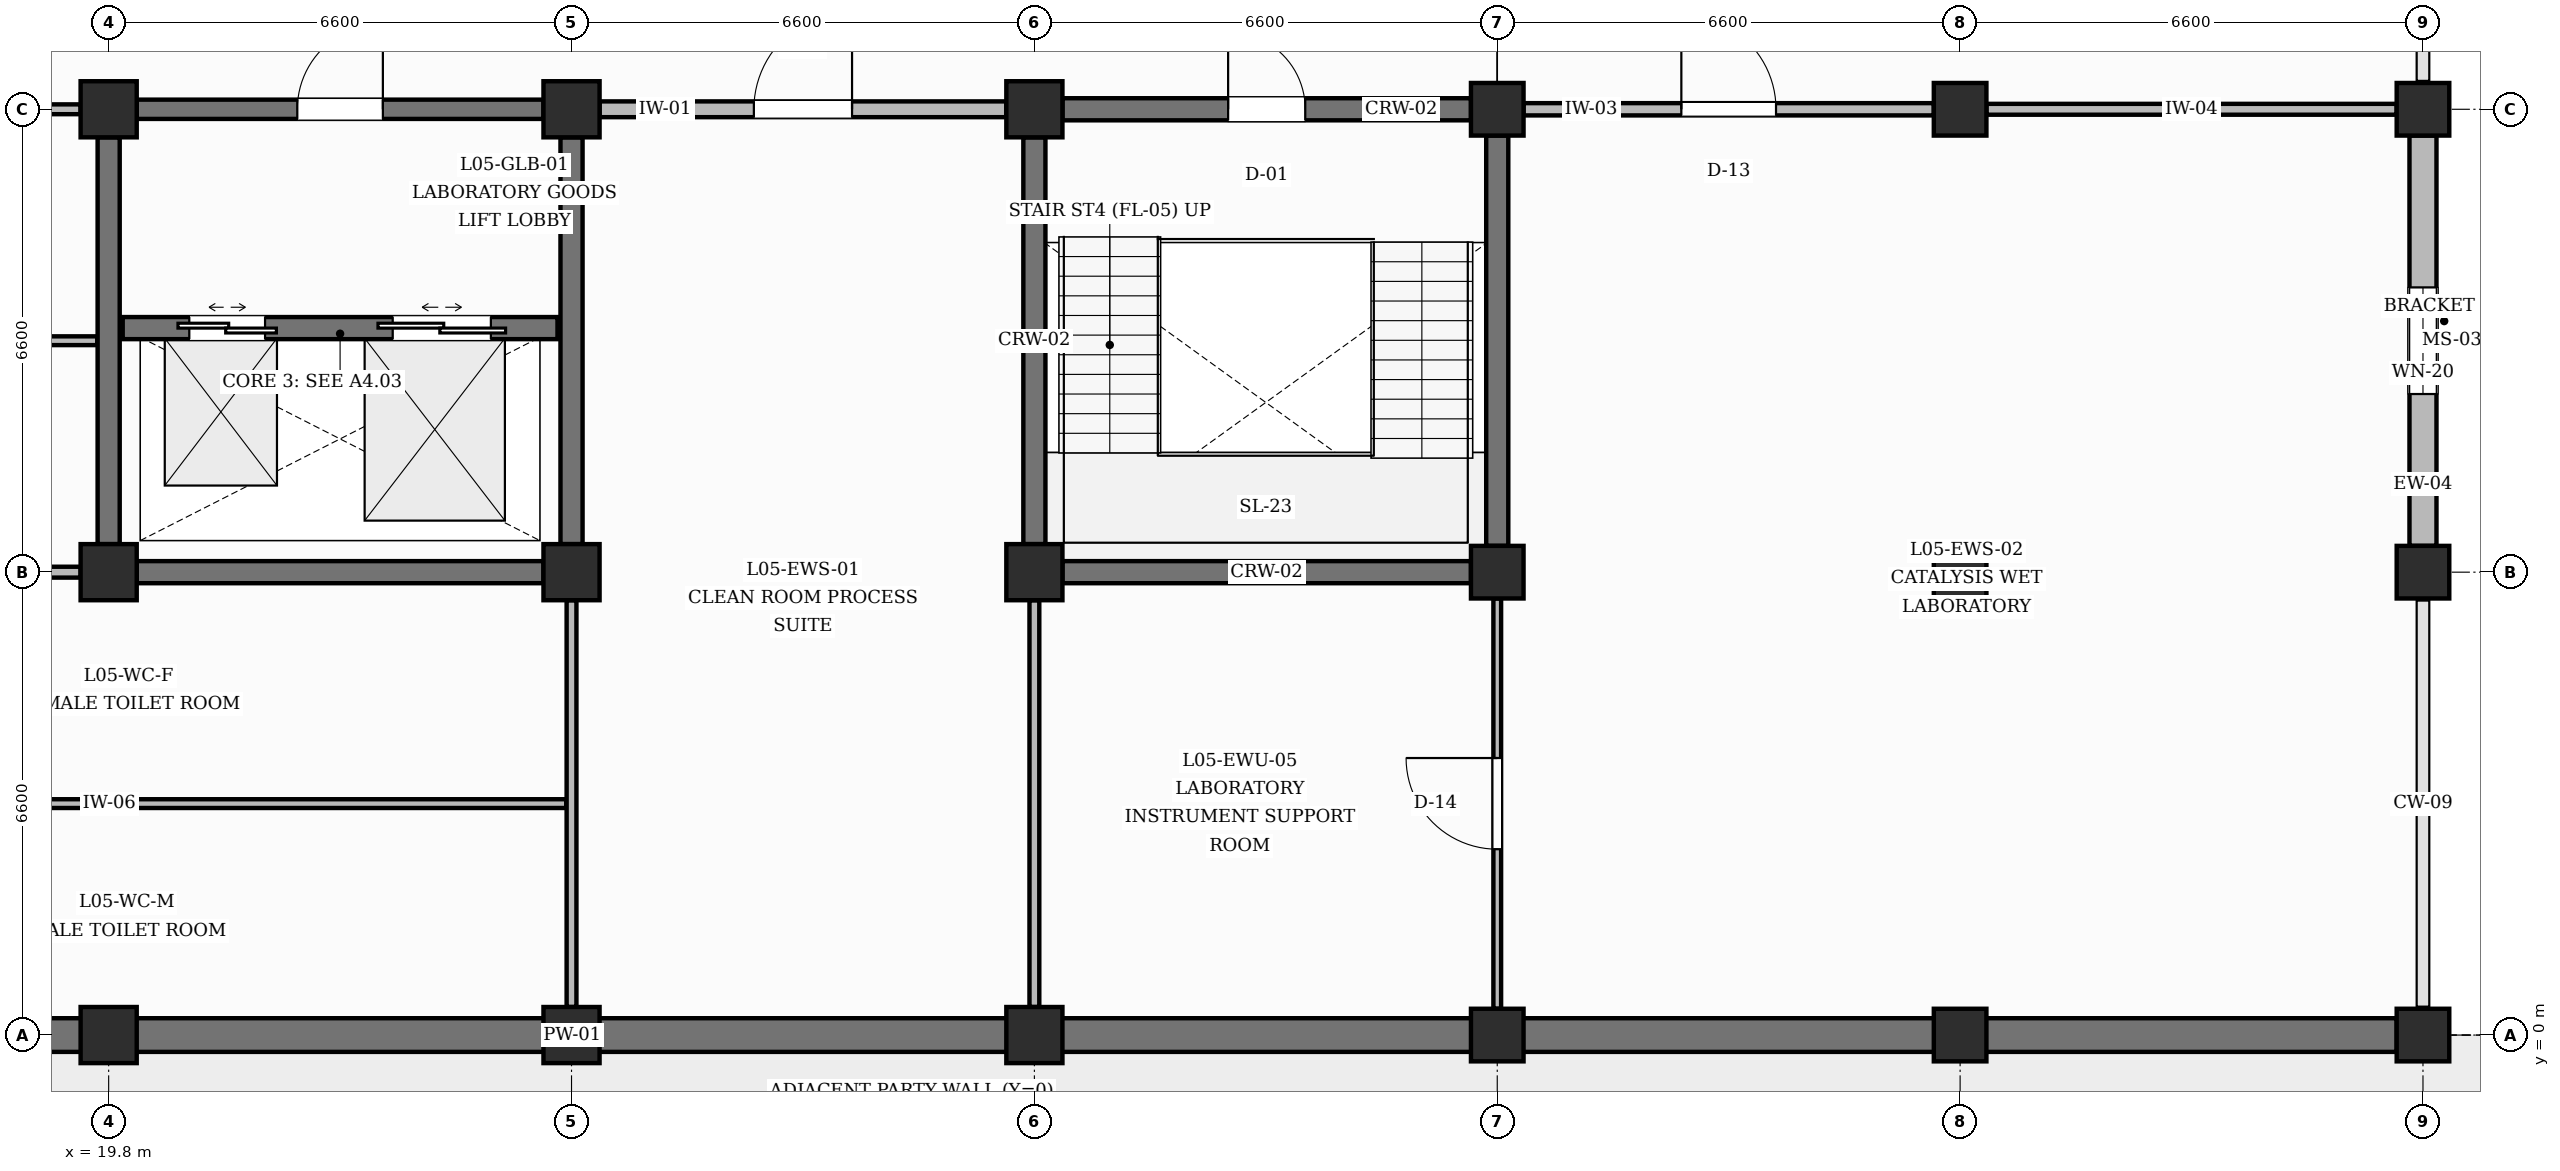
"""IFC4 building model, lengths in metres.
Left out: names, types, materials, properties, quantities, classifications, styles, units other than length and angle.
Written with IfcOpenShell. Run it as: python <this file> out.ifc"""

import sys

from ifc_helpers import new_model, si_unit, direction, frame, frame_2d, origin, origin_2d, place, context, subcontext, project, spatial, rectangle, extrude, element, fill, save


model = new_model("IFC4")
c1 = context("Model", 3, precision=1e-05, world=origin(), true_north=direction((0.0, 1.0)))
c2 = subcontext(c1, "Body", "Model", "MODEL_VIEW")
j1 = project(units=[si_unit("LENGTHUNIT", "METRE"), si_unit("PLANEANGLEUNIT", "RADIAN")], contexts=[c1])
p1 = place(None, origin())
s1 = spatial("IfcSite", under=j1, at=p1, CompositionType="ELEMENT")
p2 = place(p1, origin())
s2 = spatial("IfcBuilding", under=s1, at=p2, CompositionType="ELEMENT")
p3 = place(p2, frame((0.0, 0.0, 22.8)))
s3 = spatial("IfcBuildingStorey", under=s2, at=p3, CompositionType="ELEMENT", Elevation=22.8)
for number, where, z_axis, x_axis in (
    (1, (19.8, 0.0, 0.0), (0.0, 0.0, 1.0), (1.0, 0.0, 0.0)),
    (2, (19.8, 6.6, 0.0), (0.0, 0.0, 1.0), (1.0, 0.0, 0.0)),
    (3, (19.8, 13.2, 0.0), (0.0, 0.0, 1.0), (1.0, 0.0, 0.0)),
    (4, (26.4, 0.0, 0.0), (0.0, 0.0, 1.0), (1.0, 0.0, 0.0)),
    (5, (26.4, 6.6, 0.0), (0.0, 0.0, 1.0), (1.0, 0.0, 0.0)),
    (6, (26.4, 13.2, 0.0), (0.0, 0.0, 1.0), (1.0, 0.0, 0.0)),
    (7, (33.0, 0.0, 0.0), (0.0, 0.0, 1.0), (1.0, 0.0, 0.0)),
    (8, (33.0, 6.6, 0.0), (0.0, 0.0, 1.0), (1.0, 0.0, 0.0)),
    (9, (33.0, 13.2, 0.0), (0.0, 0.0, 1.0), (1.0, 0.0, 0.0)),
):
    element("IfcColumn", number, at=place(p3, frame(where, z_axis=z_axis, x_axis=x_axis)), inside=s3, PredefinedType="COLUMN", context=c2, shape_type="SweptSolid", body=[
        extrude(rectangle(XDim=0.8, YDim=0.8, at=origin_2d()), origin(), (0.0, 0.0, 1.0), 4.2),
    ])
for number, where, z_axis, x_axis in (
    (10, (39.6, 0.0, 0.0), (0.0, 0.0, 1.0), (1.0, 0.0, 0.0)),
    (11, (39.6, 6.6, 0.0), (0.0, 0.0, 1.0), (1.0, 0.0, 0.0)),
    (12, (39.6, 13.2, 0.0), (0.0, 0.0, 1.0), (1.0, 0.0, 0.0)),
    (13, (46.2, 0.0, 0.0), (0.0, 0.0, 1.0), (1.0, 0.0, 0.0)),
    (14, (46.2, 6.6, 0.0), (0.0, 0.0, 1.0), (1.0, 0.0, 0.0)),
    (15, (46.2, 13.2, 0.0), (0.0, 0.0, 1.0), (1.0, 0.0, 0.0)),
    (16, (52.8, 0.0, 0.0), (0.0, 0.0, 1.0), (1.0, 0.0, 0.0)),
    (17, (52.8, 6.6, 0.0), (0.0, 0.0, 1.0), (1.0, 0.0, 0.0)),
    (18, (52.8, 13.2, 0.0), (0.0, 0.0, 1.0), (1.0, 0.0, 0.0)),
):
    element("IfcColumn", number, at=place(p3, frame(where, z_axis=z_axis, x_axis=x_axis)), inside=s3, PredefinedType="COLUMN", context=c2, shape_type="SweptSolid", body=[
        extrude(rectangle(XDim=0.75, YDim=0.75, at=origin_2d()), origin(), (0.0, 0.0, 1.0), 4.2),
    ])
p4 = place(p3, frame((13.6, 0.0, 0.0), z_axis=(0.0, 0.0, 1.0), x_axis=(1.0, 0.0, 0.0)))
e19 = element("IfcWall", 19, at=p4, inside=s3, PredefinedType="SOLIDWALL", context=c2, shape_type="SweptSolid", body=[
    extrude(rectangle(XDim=5.8, YDim=0.48, at=frame_2d((2.9, 0.0))), origin(), (0.0, 0.0, 1.0), 3.27),
])
for number, where, z_axis, x_axis in (
    (20, (20.2, 0.0, 0.0), (0.0, 0.0, 1.0), (1.0, 0.0, 0.0)),
    (21, (26.8, 0.0, 0.0), (0.0, 0.0, 1.0), (1.0, 0.0, 0.0)),
):
    element("IfcWall", number, at=place(p3, frame(where, z_axis=z_axis, x_axis=x_axis)), inside=s3, PredefinedType="SOLIDWALL", context=c2, shape_type="SweptSolid", body=[
        extrude(rectangle(XDim=5.8, YDim=0.48, at=frame_2d((2.9, 0.0))), origin(), (0.0, 0.0, 1.0), 3.27),
    ])
p5 = place(p3, frame((33.4, 0.0, 0.0), z_axis=(0.0, 0.0, 1.0), x_axis=(1.0, 0.0, 0.0)))
e22 = element("IfcWall", 22, at=p5, inside=s3, PredefinedType="SOLIDWALL", context=c2, shape_type="SweptSolid", body=[
    extrude(rectangle(XDim=5.825, YDim=0.48, at=frame_2d((2.913, 0.0))), origin(), (0.0, 0.0, 1.0), 3.27),
])
p6 = place(p3, frame((39.975, 0.0, 0.0), z_axis=(0.0, 0.0, 1.0), x_axis=(1.0, 0.0, 0.0)))
e23 = element("IfcWall", 23, at=p6, inside=s3, PredefinedType="SOLIDWALL", context=c2, shape_type="SweptSolid", body=[
    extrude(rectangle(XDim=5.85, YDim=0.48, at=frame_2d((2.925, 0.0))), origin(), (0.0, 0.0, 1.0), 3.27),
])
p7 = place(p3, frame((46.575, 0.0, 0.0), z_axis=(0.0, 0.0, 1.0), x_axis=(1.0, 0.0, 0.0)))
e24 = element("IfcWall", 24, at=p7, inside=s3, PredefinedType="SOLIDWALL", context=c2, shape_type="SweptSolid", body=[
    extrude(rectangle(XDim=5.85, YDim=0.48, at=frame_2d((2.925, 0.0))), origin(), (0.0, 0.0, 1.0), 3.27),
])
p8 = place(p3, frame((52.8, 6.975, 0.0), z_axis=(0.0, 0.0, 1.0), x_axis=(0.0, 1.0, 0.0)))
e25 = element("IfcWall", 25, at=p8, inside=s3, PredefinedType="SOLIDWALL", context=c2, shape_type="SweptSolid", body=[
    extrude(rectangle(XDim=5.85, YDim=0.385, at=frame_2d((2.925, 0.0))), origin(), (0.0, 0.0, 1.0), 3.27),
])
p9 = place(p8, frame((2.165, 0.0, 0.95)))
e26 = element("IfcOpeningElement", 26, at=p9, cuts=e25, PredefinedType="OPENING", context=c2, shape_type="SweptSolid", body=[
    extrude(rectangle(XDim=1.52, YDim=1.96, at=frame_2d((0.76, 0.98))), frame((0.0, 0.202, 0.0), z_axis=(0.0, -1.0, 0.0), x_axis=(1.0, 0.0, 0.0)), (0.0, 0.0, 1.0), 0.405),
])
p10 = place(p3, frame((33.4, 6.6, 0.0), z_axis=(0.0, 0.0, 1.0), x_axis=(1.0, 0.0, 0.0)))
e27 = element("IfcWall", 27, at=p10, inside=s3, PredefinedType="SHEAR", context=c2, shape_type="SweptSolid", body=[
    extrude(rectangle(XDim=5.825, YDim=0.315, at=frame_2d((2.913, 0.0))), origin(), (0.0, 0.0, 1.0), 3.17),
])
p11 = place(p3, frame((33.4, 13.2, 0.0), z_axis=(0.0, 0.0, 1.0), x_axis=(1.0, 0.0, 0.0)))
e28 = element("IfcWall", 28, at=p11, inside=s3, PredefinedType="SHEAR", context=c2, shape_type="SweptSolid", body=[
    extrude(rectangle(XDim=5.825, YDim=0.315, at=frame_2d((2.913, 0.0))), origin(), (0.0, 0.0, 1.0), 3.17),
])
p12 = place(p11, frame((2.363, 0.0, 0.0)))
e29 = element("IfcOpeningElement", 29, at=p12, cuts=e28, PredefinedType="OPENING", context=c2, shape_type="SweptSolid", body=[
    extrude(rectangle(XDim=1.1, YDim=2.15, at=frame_2d((0.55, 1.075))), frame((0.0, 0.167, 0.0), z_axis=(0.0, -1.0, 0.0), x_axis=(1.0, 0.0, 0.0)), (0.0, 0.0, 1.0), 0.335),
])
p13 = place(p3, frame((33.0, 7.0, 0.0), z_axis=(0.0, 0.0, 1.0), x_axis=(0.0, 1.0, 0.0)))
e30 = element("IfcWall", 30, at=p13, inside=s3, PredefinedType="SHEAR", context=c2, shape_type="SweptSolid", body=[
    extrude(rectangle(XDim=5.8, YDim=0.315, at=frame_2d((2.9, 0.0))), origin(), (0.0, 0.0, 1.0), 3.17),
])
p14 = place(p3, frame((39.6, 6.975, 0.0), z_axis=(0.0, 0.0, 1.0), x_axis=(0.0, 1.0, 0.0)))
e31 = element("IfcWall", 31, at=p14, inside=s3, PredefinedType="SHEAR", context=c2, shape_type="SweptSolid", body=[
    extrude(rectangle(XDim=5.85, YDim=0.315, at=frame_2d((2.925, 0.0))), origin(), (0.0, 0.0, 1.0), 3.17),
])
for number, where, z_axis, x_axis in (
    (32, (20.2, 6.6, 0.0), (0.0, 0.0, 1.0), (1.0, 0.0, 0.0)),
    (33, (19.8, 7.0, 0.0), (0.0, 0.0, 1.0), (0.0, 1.0, 0.0)),
    (34, (26.4, 7.0, 0.0), (0.0, 0.0, 1.0), (0.0, 1.0, 0.0)),
):
    element("IfcWall", number, at=place(p3, frame(where, z_axis=z_axis, x_axis=x_axis)), inside=s3, PredefinedType="SHEAR", context=c2, shape_type="SweptSolid", body=[
        extrude(rectangle(XDim=5.8, YDim=0.315, at=frame_2d((2.9, 0.0))), origin(), (0.0, 0.0, 1.0), 3.17),
    ])
p15 = place(p3, frame((20.2, 13.2, 0.0), z_axis=(0.0, 0.0, 1.0), x_axis=(1.0, 0.0, 0.0)))
e35 = element("IfcWall", 35, at=p15, inside=s3, PredefinedType="SHEAR", context=c2, shape_type="SweptSolid", body=[
    extrude(rectangle(XDim=5.8, YDim=0.275, at=frame_2d((2.9, 0.0))), origin(), (0.0, 0.0, 1.0), 3.17),
])
p16 = place(p15, frame((2.29, 0.0, 0.0)))
e36 = element("IfcOpeningElement", 36, at=p16, cuts=e35, PredefinedType="OPENING", context=c2, shape_type="SweptSolid", body=[
    extrude(rectangle(XDim=1.22, YDim=2.15, at=frame_2d((0.61, 1.075))), frame((0.0, 0.147, 0.0), z_axis=(0.0, -1.0, 0.0), x_axis=(1.0, 0.0, 0.0)), (0.0, 0.0, 1.0), 0.295),
])
p17 = place(p3, frame((20.0, 10.08, 0.0), z_axis=(0.0, 0.0, 1.0), x_axis=(1.0, 0.0, 0.0)))
e37 = element("IfcWall", 37, at=p17, inside=s3, PredefinedType="SHEAR", context=c2, shape_type="SweptSolid", body=[
    extrude(rectangle(XDim=6.2, YDim=0.315, at=frame_2d((3.1, 0.0))), origin(), (0.0, 0.0, 1.0), 3.87),
])
p18 = place(p17, frame((0.95, 0.0, 0.0)))
e38 = element("IfcOpeningElement", 38, at=p18, cuts=e37, PredefinedType="OPENING", context=c2, shape_type="SweptSolid", body=[
    extrude(rectangle(XDim=1.08, YDim=2.15, at=frame_2d((0.54, 1.075))), frame((0.0, 0.167, 0.0), z_axis=(0.0, -1.0, 0.0), x_axis=(1.0, 0.0, 0.0)), (0.0, 0.0, 1.0), 0.335),
])
p19 = place(p17, frame((3.85, 0.0, 0.0)))
e39 = element("IfcOpeningElement", 39, at=p19, cuts=e37, PredefinedType="OPENING", context=c2, shape_type="SweptSolid", body=[
    extrude(rectangle(XDim=1.4, YDim=2.35, at=frame_2d((0.7, 1.175))), frame((0.0, 0.167, 0.0), z_axis=(0.0, -1.0, 0.0), x_axis=(1.0, 0.0, 0.0)), (0.0, 0.0, 1.0), 0.335),
])
p20 = place(p3, frame((26.4, 0.4, 0.0), z_axis=(0.0, 0.0, 1.0), x_axis=(0.0, 1.0, 0.0)))
e40 = element("IfcWall", 40, at=p20, inside=s3, PredefinedType="PARTITIONING", context=c2, shape_type="SweptSolid", body=[
    extrude(rectangle(XDim=5.8, YDim=0.14, at=frame_2d((2.9, 0.0))), origin(), (0.0, 0.0, 1.0), 3.17),
])
p21 = place(p3, frame((13.6, 6.6, 0.0), z_axis=(0.0, 0.0, 1.0), x_axis=(1.0, 0.0, 0.0)))
e41 = element("IfcWall", 41, at=p21, inside=s3, PredefinedType="PARTITIONING", context=c2, shape_type="SweptSolid", body=[
    extrude(rectangle(XDim=5.8, YDim=0.155, at=frame_2d((2.9, 0.0))), origin(), (0.0, 0.0, 1.0), 3.17),
])
p22 = place(p3, frame((13.6, 13.2, 0.0), z_axis=(0.0, 0.0, 1.0), x_axis=(1.0, 0.0, 0.0)))
e42 = element("IfcWall", 42, at=p22, inside=s3, PredefinedType="PARTITIONING", context=c2, shape_type="SweptSolid", body=[
    extrude(rectangle(XDim=5.8, YDim=0.14, at=frame_2d((2.9, 0.0))), origin(), (0.0, 0.0, 1.0), 3.17),
])
p23 = place(p3, frame((33.0, 0.4, 0.0), z_axis=(0.0, 0.0, 1.0), x_axis=(0.0, 1.0, 0.0)))
e43 = element("IfcWall", 43, at=p23, inside=s3, PredefinedType="PARTITIONING", context=c2, shape_type="SweptSolid", body=[
    extrude(rectangle(XDim=5.8, YDim=0.14, at=frame_2d((2.9, 0.0))), origin(), (0.0, 0.0, 1.0), 3.17),
])
p24 = place(p3, frame((26.8, 13.2, 0.0), z_axis=(0.0, 0.0, 1.0), x_axis=(1.0, 0.0, 0.0)))
e44 = element("IfcWall", 44, at=p24, inside=s3, PredefinedType="PARTITIONING", context=c2, shape_type="SweptSolid", body=[
    extrude(rectangle(XDim=5.8, YDim=0.225, at=frame_2d((2.9, 0.0))), origin(), (0.0, 0.0, 1.0), 3.17),
])
p25 = place(p24, frame((2.2, 0.0, 0.0)))
e45 = element("IfcOpeningElement", 45, at=p25, cuts=e44, PredefinedType="OPENING", context=c2, shape_type="SweptSolid", body=[
    extrude(rectangle(XDim=1.4, YDim=2.25, at=frame_2d((0.7, 1.125))), frame((0.0, 0.123, 0.0), z_axis=(0.0, -1.0, 0.0), x_axis=(1.0, 0.0, 0.0)), (0.0, 0.0, 1.0), 0.245),
])
p26 = place(p3, frame((39.6, 0.375, 0.0), z_axis=(0.0, 0.0, 1.0), x_axis=(0.0, 1.0, 0.0)))
e46 = element("IfcWall", 46, at=p26, inside=s3, PredefinedType="PARTITIONING", context=c2, shape_type="SweptSolid", body=[
    extrude(rectangle(XDim=5.85, YDim=0.11, at=frame_2d((2.925, 0.0))), origin(), (0.0, 0.0, 1.0), 3.17),
])
p27 = place(p26, frame((2.275, 0.0, 0.0)))
e47 = element("IfcOpeningElement", 47, at=p27, cuts=e46, PredefinedType="OPENING", context=c2, shape_type="SweptSolid", body=[
    extrude(rectangle(XDim=1.3, YDim=2.3, at=frame_2d((0.65, 1.15))), frame((0.0, 0.065, 0.0), z_axis=(0.0, -1.0, 0.0), x_axis=(1.0, 0.0, 0.0)), (0.0, 0.0, 1.0), 0.13),
])
p28 = place(p3, frame((39.975, 13.2, 0.0), z_axis=(0.0, 0.0, 1.0), x_axis=(1.0, 0.0, 0.0)))
e48 = element("IfcWall", 48, at=p28, inside=s3, PredefinedType="PARTITIONING", context=c2, shape_type="SweptSolid", body=[
    extrude(rectangle(XDim=5.85, YDim=0.175, at=frame_2d((2.925, 0.0))), origin(), (0.0, 0.0, 1.0), 3.17),
])
p29 = place(p28, frame((2.25, 0.0, 0.0)))
e49 = element("IfcOpeningElement", 49, at=p29, cuts=e48, PredefinedType="OPENING", context=c2, shape_type="SweptSolid", body=[
    extrude(rectangle(XDim=1.35, YDim=2.3, at=frame_2d((0.675, 1.15))), frame((0.0, 0.097, 0.0), z_axis=(0.0, -1.0, 0.0), x_axis=(1.0, 0.0, 0.0)), (0.0, 0.0, 1.0), 0.195),
])
p30 = place(p3, frame((46.575, 13.2, 0.0), z_axis=(0.0, 0.0, 1.0), x_axis=(1.0, 0.0, 0.0)))
e50 = element("IfcWall", 50, at=p30, inside=s3, PredefinedType="PARTITIONING", context=c2, shape_type="SweptSolid", body=[
    extrude(rectangle(XDim=5.85, YDim=0.155, at=frame_2d((2.925, 0.0))), origin(), (0.0, 0.0, 1.0), 3.17),
])
p31 = place(p3, frame((13.292, 3.3, 0.0), z_axis=(0.0, 0.0, 1.0), x_axis=(1.0, 0.0, 0.0)))
e51 = element("IfcWall", 51, at=p31, inside=s3, PredefinedType="PARTITIONING", context=c2, shape_type="SweptSolid", body=[
    extrude(rectangle(XDim=13.032, YDim=0.125, at=frame_2d((6.516, 0.0))), origin(), (0.0, 0.0, 1.0), 3.87),
])
p32 = place(p3, frame((13.282, 9.9, 0.0), z_axis=(0.0, 0.0, 1.0), x_axis=(1.0, 0.0, 0.0)))
e52 = element("IfcWall", 52, at=p32, inside=s3, PredefinedType="PARTITIONING", context=c2, shape_type="SweptSolid", body=[
    extrude(rectangle(XDim=6.355, YDim=0.125, at=frame_2d((3.177, 0.0))), origin(), (0.0, 0.0, 1.0), 3.87),
])
p33 = place(p9, origin())
e53 = element("IfcWindow", 53, at=p33, inside=s3, PartitioningType="DOUBLE_PANEL_VERTICAL", PredefinedType="WINDOW", context=c2, shape_type="SweptSolid", body=[
    extrude(rectangle(XDim=1.52, YDim=1.96, at=frame_2d((0.76, 0.98))), frame((0.0, 0.03, 0.0), z_axis=(0.0, -1.0, 0.0), x_axis=(1.0, 0.0, 0.0)), (0.0, 0.0, 1.0), 0.06),
])
fill(e26, e53)
p34 = place(p12, origin())
e54 = element("IfcDoor", 54, at=p34, inside=s3, OperationType="SINGLE_SWING_LEFT", PredefinedType="DOOR", context=c2, shape_type="SweptSolid", body=[
    extrude(rectangle(XDim=1.1, YDim=2.15, at=frame_2d((0.55, 1.075))), frame((0.0, 0.025, 0.0), z_axis=(0.0, -1.0, 0.0), x_axis=(1.0, 0.0, 0.0)), (0.0, 0.0, 1.0), 0.05),
])
fill(e29, e54)
p35 = place(p18, origin())
e55 = element("IfcDoor", 55, at=p35, inside=s3, OperationType="DOUBLE_DOOR_SLIDING", PredefinedType="USERDEFINED", context=c2, shape_type="SweptSolid", body=[
    extrude(rectangle(XDim=1.08, YDim=2.15, at=frame_2d((0.54, 1.075))), frame((0.0, 0.025, 0.0), z_axis=(0.0, -1.0, 0.0), x_axis=(1.0, 0.0, 0.0)), (0.0, 0.0, 1.0), 0.05),
])
fill(e38, e55)
p36 = place(p19, origin())
e56 = element("IfcDoor", 56, at=p36, inside=s3, OperationType="DOUBLE_DOOR_SLIDING", PredefinedType="USERDEFINED", context=c2, shape_type="SweptSolid", body=[
    extrude(rectangle(XDim=1.4, YDim=2.35, at=frame_2d((0.7, 1.175))), frame((0.0, 0.025, 0.0), z_axis=(0.0, -1.0, 0.0), x_axis=(1.0, 0.0, 0.0)), (0.0, 0.0, 1.0), 0.05),
])
fill(e39, e56)
p37 = place(p16, origin())
e57 = element("IfcDoor", 57, at=p37, inside=s3, OperationType="SINGLE_SWING_RIGHT", PredefinedType="DOOR", context=c2, shape_type="SweptSolid", body=[
    extrude(rectangle(XDim=1.22, YDim=2.15, at=frame_2d((0.61, 1.075))), frame((0.0, 0.025, 0.0), z_axis=(0.0, -1.0, 0.0), x_axis=(1.0, 0.0, 0.0)), (0.0, 0.0, 1.0), 0.05),
])
fill(e36, e57)
p38 = place(p25, origin())
e58 = element("IfcDoor", 58, at=p38, inside=s3, OperationType="SINGLE_SWING_RIGHT", PredefinedType="DOOR", context=c2, shape_type="SweptSolid", body=[
    extrude(rectangle(XDim=1.4, YDim=2.25, at=frame_2d((0.7, 1.125))), frame((0.0, 0.025, 0.0), z_axis=(0.0, -1.0, 0.0), x_axis=(1.0, 0.0, 0.0)), (0.0, 0.0, 1.0), 0.05),
])
fill(e45, e58)
p39 = place(p29, origin())
e59 = element("IfcDoor", 59, at=p39, inside=s3, OperationType="SINGLE_SWING_LEFT", PredefinedType="DOOR", context=c2, shape_type="SweptSolid", body=[
    extrude(rectangle(XDim=1.35, YDim=2.3, at=frame_2d((0.675, 1.15))), frame((0.0, 0.025, 0.0), z_axis=(0.0, -1.0, 0.0), x_axis=(1.0, 0.0, 0.0)), (0.0, 0.0, 1.0), 0.05),
])
fill(e49, e59)
p40 = place(p27, origin())
e60 = element("IfcDoor", 60, at=p40, inside=s3, OperationType="SINGLE_SWING_RIGHT", PredefinedType="DOOR", context=c2, shape_type="SweptSolid", body=[
    extrude(rectangle(XDim=1.3, YDim=2.3, at=frame_2d((0.65, 1.15))), frame((0.0, 0.025, 0.0), z_axis=(0.0, -1.0, 0.0), x_axis=(1.0, 0.0, 0.0)), (0.0, 0.0, 1.0), 0.05),
])
fill(e47, e60)
save(model, sys.argv[1])
